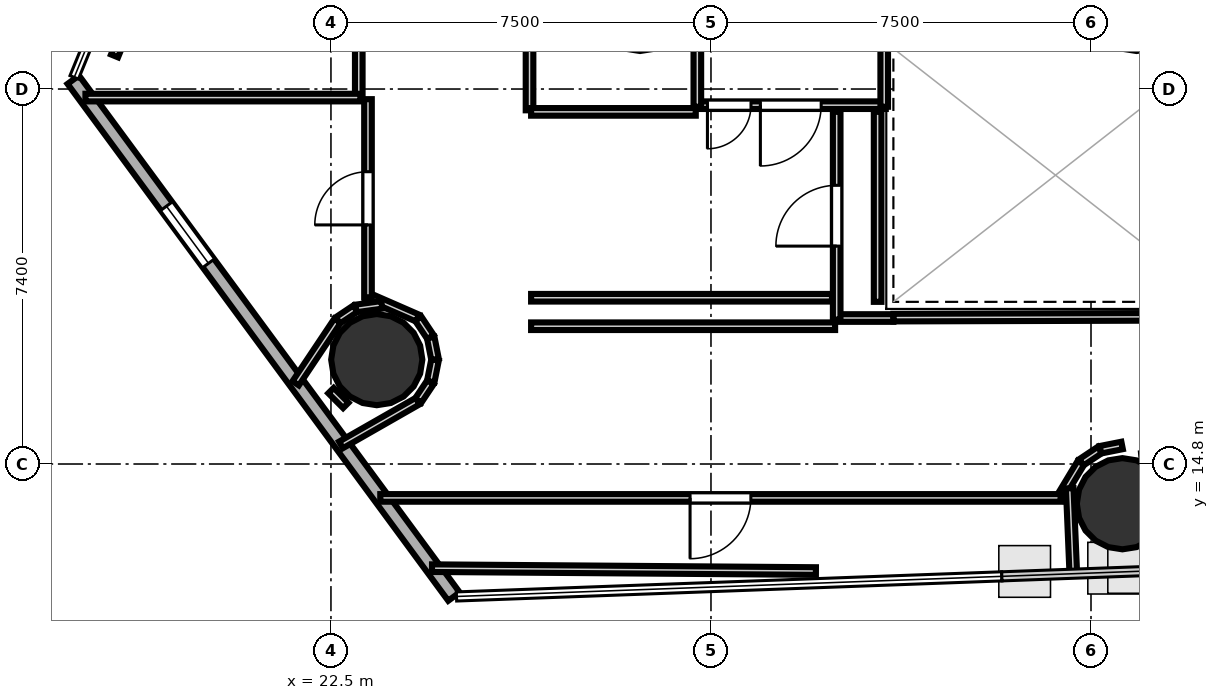
"""IFC4 building model, lengths in metres.
Left out: names, types, materials, properties, quantities, classifications, styles, units other than length and angle.
Written with IfcOpenShell. Run it as: python <this file> out.ifc"""

import sys

from ifc_helpers import new_model, si_unit, direction, frame, frame_2d, origin, origin_2d, place, context, subcontext, project, spatial, rectangle, hollow_circle, extrude, element, fill, save


model = new_model("IFC4")
c1 = context("Model", 3, precision=1e-05, world=origin(), true_north=direction((0.0, 1.0)))
c2 = subcontext(c1, "Body", "Model", "MODEL_VIEW")
j1 = project(units=[si_unit("LENGTHUNIT", "METRE"), si_unit("PLANEANGLEUNIT", "RADIAN")], contexts=[c1])
p1 = place(None, origin())
s1 = spatial("IfcSite", under=j1, at=p1, CompositionType="ELEMENT")
p2 = place(p1, origin())
s2 = spatial("IfcBuilding", under=s1, at=p2, CompositionType="ELEMENT")
p3 = place(p2, frame((0.0, 0.0, 47.9)))
s3 = spatial("IfcBuildingStorey", under=s2, at=p3, CompositionType="ELEMENT", Elevation=47.9)
for number, where, z_axis, x_axis in (
    (1, (23.404, 16.86, 0.0), (0.0, 0.0, 1.0), (1.0, 0.0, 0.0)),
    (2, (38.12, 14.016, 0.0), (0.0, 0.0, 1.0), (1.0, 0.0, 0.0)),
):
    element("IfcColumn", number, at=place(p3, frame(where, z_axis=z_axis, x_axis=x_axis)), inside=s3, PredefinedType="COLUMN", context=c2, shape_type="SweptSolid", body=[
        extrude(hollow_circle(Radius=0.9, WallThickness=0.045, at=origin_2d()), origin(), (0.0, 0.0, 1.0), 4.6),
    ])
p4 = place(p3, frame((17.415, 22.384, 0.0), z_axis=(0.0, 0.0, 1.0), x_axis=(0.593055059992, -0.805161906587, 0.0)))
e3 = element("IfcWall", 3, at=p4, inside=s3, PredefinedType="SOLIDWALL", context=c2, shape_type="SweptSolid", body=[
    extrude(rectangle(XDim=12.668, YDim=0.28, at=frame_2d((6.334, 0.0))), origin(), (0.0, 0.0, 1.0), 4.42),
])
p5 = place(p4, frame((3.101, 0.0, 1.0)))
e4 = element("IfcOpeningElement", 4, at=p5, cuts=e3, PredefinedType="OPENING", context=c2, shape_type="SweptSolid", body=[
    extrude(rectangle(XDim=1.4, YDim=1.5, at=frame_2d((0.7, 0.75))), frame((0.0, 0.15, 0.0), z_axis=(0.0, -1.0, 0.0), x_axis=(1.0, 0.0, 0.0)), (0.0, 0.0, 1.0), 0.3),
])
p6 = place(p3, frame((33.45, 21.881, 0.0), z_axis=(0.0, 0.0, 1.0), x_axis=(-1.0, 0.0, 0.0)))
e5 = element("IfcWall", 5, at=p6, inside=s3, PredefinedType="PARTITIONING", context=c2, shape_type="SweptSolid", body=[
    extrude(rectangle(XDim=3.75, YDim=0.15, at=frame_2d((1.875, 0.0))), origin(), (0.0, 0.0, 1.0), 2.94),
])
p7 = place(p6, frame((1.275, 0.0, 0.0)))
e6 = element("IfcOpeningElement", 6, at=p7, cuts=e5, PredefinedType="OPENING", context=c2, shape_type="SweptSolid", body=[
    extrude(rectangle(XDim=1.2, YDim=2.15, at=frame_2d((0.6, 1.075))), frame((0.0, 0.085, 0.0), z_axis=(0.0, -1.0, 0.0), x_axis=(1.0, 0.0, 0.0)), (0.0, 0.0, 1.0), 0.17),
])
p8 = place(p6, frame((2.66, 0.0, 0.0)))
e7 = element("IfcOpeningElement", 7, at=p8, cuts=e5, PredefinedType="OPENING", context=c2, shape_type="SweptSolid", body=[
    extrude(rectangle(XDim=0.86, YDim=2.05, at=frame_2d((0.43, 1.025))), frame((0.0, 0.085, 0.0), z_axis=(0.0, -1.0, 0.0), x_axis=(1.0, 0.0, 0.0)), (0.0, 0.0, 1.0), 0.17),
])
for number, where, z_axis, x_axis in (
    (8, (29.731, 21.85, 0.0), (0.0, 0.0, 1.0), (0.0, 1.0, 0.0)),
    (9, (33.419, 24.342, 0.0), (0.0, 0.0, 1.0), (0.0, -1.0, 0.0)),
):
    element("IfcWall", number, at=place(p3, frame(where, z_axis=z_axis, x_axis=x_axis)), inside=s3, PredefinedType="PARTITIONING", context=c2, shape_type="SweptSolid", body=[
        extrude(rectangle(XDim=2.492, YDim=0.15, at=frame_2d((1.246, 0.0))), origin(), (0.0, 0.0, 1.0), 2.94),
    ])
p9 = place(p3, frame((23.049, 32.204, 0.0), z_axis=(0.0, 0.0, 1.0), x_axis=(0.0, -1.0, 0.0)))
e10 = element("IfcWall", 10, at=p9, inside=s3, PredefinedType="PARTITIONING", context=c2, shape_type="SweptSolid", body=[
    extrude(rectangle(XDim=10.204, YDim=0.15, at=frame_2d((5.102, 0.0))), origin(), (0.0, 0.0, 1.0), 2.94),
])
p10 = place(p9, frame((4.502, 0.0, 0.0)))
e11 = element("IfcOpeningElement", 11, at=p10, cuts=e10, PredefinedType="OPENING", context=c2, shape_type="SweptSolid", body=[
    extrude(rectangle(XDim=1.2, YDim=2.15, at=frame_2d((0.6, 1.075))), frame((0.0, 0.085, 0.0), z_axis=(0.0, -1.0, 0.0), x_axis=(1.0, 0.0, 0.0)), (0.0, 0.0, 1.0), 0.17),
])
p11 = place(p3, frame((23.08, 22.031, 0.0), z_axis=(0.0, 0.0, 1.0), x_axis=(-1.0, 0.0, 0.0)))
e12 = element("IfcWall", 12, at=p11, inside=s3, PredefinedType="PARTITIONING", context=c2, shape_type="SweptSolid", body=[
    extrude(rectangle(XDim=5.426, YDim=0.15, at=frame_2d((2.713, 0.0))), origin(), (0.0, 0.0, 1.0), 2.94),
])
p12 = place(p3, frame((18.229, 22.854, 0.0), z_axis=(0.0, 0.0, 1.0), x_axis=(0.378492290578, 0.925604443579, 0.0)))
e13 = element("IfcWall", 13, at=p12, inside=s3, PredefinedType="PARTITIONING", context=c2, shape_type="SweptSolid", body=[
    extrude(rectangle(XDim=10.889, YDim=0.15, at=frame_2d((5.445, 0.0))), origin(), (0.0, 0.0, 1.0), 2.94),
])
p13 = place(p3, frame((33.6, 17.689, 0.0), z_axis=(0.0, 0.0, 1.0), x_axis=(0.999995817826, 0.002892115308, 0.0)))
e14 = element("IfcWall", 14, at=p13, inside=s3, PredefinedType="PARTITIONING", context=c2, shape_type="SweptSolid", body=[
    extrude(rectangle(XDim=6.5, YDim=0.15, at=frame_2d((3.25, 0.0))), origin(), (0.0, 0.0, 1.0), 2.94),
])
p14 = place(p3, frame((33.6, 17.681, 0.0), z_axis=(0.0, 0.0, 1.0), x_axis=(-1.0, 0.0, 0.0)))
e15 = element("IfcWall", 15, at=p14, inside=s3, PredefinedType="PARTITIONING", context=c2, shape_type="SweptSolid", body=[
    extrude(rectangle(XDim=1.15, YDim=0.15, at=frame_2d((0.575, 0.0))), origin(), (0.0, 0.0, 1.0), 2.94),
])
p15 = place(p3, frame((32.481, 17.65, 0.0), z_axis=(0.0, 0.0, 1.0), x_axis=(0.0, 1.0, 0.0)))
e16 = element("IfcWall", 16, at=p15, inside=s3, PredefinedType="PARTITIONING", context=c2, shape_type="SweptSolid", body=[
    extrude(rectangle(XDim=4.1, YDim=0.15, at=frame_2d((2.05, 0.0))), origin(), (0.0, 0.0, 1.0), 2.94),
])
p16 = place(p15, frame((1.45, 0.0, 0.0)))
e17 = element("IfcOpeningElement", 17, at=p16, cuts=e16, PredefinedType="OPENING", context=c2, shape_type="SweptSolid", body=[
    extrude(rectangle(XDim=1.2, YDim=2.15, at=frame_2d((0.6, 1.075))), frame((0.0, 0.085, 0.0), z_axis=(0.0, -1.0, 0.0), x_axis=(1.0, 0.0, 0.0)), (0.0, 0.0, 1.0), 0.17),
])
p17 = place(p3, frame((33.289, 21.75, 0.0), z_axis=(0.0, 0.0, 1.0), x_axis=(0.0, -1.0, 0.0)))
e18 = element("IfcWall", 18, at=p17, inside=s3, PredefinedType="PARTITIONING", context=c2, shape_type="SweptSolid", body=[
    extrude(rectangle(XDim=3.75, YDim=0.15, at=frame_2d((1.875, 0.0))), origin(), (0.0, 0.0, 1.0), 2.94),
])
p18 = place(p3, frame((26.419, 24.548, 0.0), z_axis=(0.0, 0.0, 1.0), x_axis=(0.0, -1.0, 0.0)))
e19 = element("IfcWall", 19, at=p18, inside=s3, PredefinedType="PARTITIONING", context=c2, shape_type="SweptSolid", body=[
    extrude(rectangle(XDim=2.768, YDim=0.15, at=frame_2d((1.384, 0.0))), origin(), (0.0, 0.0, 1.0), 2.94),
])
p19 = place(p3, frame((26.45, 21.749, 0.0), z_axis=(0.0, 0.0, 1.0), x_axis=(1.0, 0.0, 0.0)))
e20 = element("IfcWall", 20, at=p19, inside=s3, PredefinedType="PARTITIONING", context=c2, shape_type="SweptSolid", body=[
    extrude(rectangle(XDim=3.25, YDim=0.15, at=frame_2d((1.625, 0.0))), origin(), (0.0, 0.0, 1.0), 2.94),
])
p20 = place(p3, frame((32.388, 18.081, 0.0), z_axis=(0.0, 0.0, 1.0), x_axis=(-1.0, 0.0, 0.0)))
e21 = element("IfcWall", 21, at=p20, inside=s3, PredefinedType="PARTITIONING", context=c2, shape_type="SweptSolid", body=[
    extrude(rectangle(XDim=5.938, YDim=0.15, at=frame_2d((2.969, 0.0))), origin(), (0.0, 0.0, 1.0), 2.94),
])
p21 = place(p3, frame((26.45, 17.519, 0.0), z_axis=(0.0, 0.0, 1.0), x_axis=(1.0, 0.0, 0.0)))
e22 = element("IfcWall", 22, at=p21, inside=s3, PredefinedType="PARTITIONING", context=c2, shape_type="SweptSolid", body=[
    extrude(rectangle(XDim=6.0, YDim=0.15, at=frame_2d((3.0, 0.0))), origin(), (0.0, 0.0, 1.0), 2.94),
])
p22 = place(p3, frame((38.114, 15.167, 0.0), z_axis=(0.0, 0.0, 1.0), x_axis=(-0.980709346372, -0.195471680655, 0.0)))
e23 = element("IfcWall", 23, at=p22, inside=s3, PredefinedType="PARTITIONING", context=c2, shape_type="SweptSolid", body=[
    extrude(rectangle(XDim=0.437, YDim=0.15, at=frame_2d((0.219, 0.0))), origin(), (0.0, 0.0, 1.0), 2.94),
])
p23 = place(p3, frame((37.674, 15.076, 0.0), z_axis=(0.0, 0.0, 1.0), x_axis=(-0.83170640099, -0.555215690117, 0.0)))
e24 = element("IfcWall", 24, at=p23, inside=s3, PredefinedType="PARTITIONING", context=c2, shape_type="SweptSolid", body=[
    extrude(rectangle(XDim=0.437, YDim=0.15, at=frame_2d((0.219, 0.0))), origin(), (0.0, 0.0, 1.0), 2.94),
])
p24 = place(p3, frame((37.302, 14.824, 0.0), z_axis=(0.0, 0.0, 1.0), x_axis=(-0.516448492629, -0.856318255359, 0.0)))
e25 = element("IfcWall", 25, at=p24, inside=s3, PredefinedType="PARTITIONING", context=c2, shape_type="SweptSolid", body=[
    extrude(rectangle(XDim=0.827, YDim=0.15, at=frame_2d((0.414, 0.0))), origin(), (0.0, 0.0, 1.0), 2.94),
])
p25 = place(p3, frame((36.901, 14.131, 0.0), z_axis=(0.0, 0.0, 1.0), x_axis=(-1.0, 0.0, 0.0)))
e26 = element("IfcWall", 26, at=p25, inside=s3, PredefinedType="PARTITIONING", context=c2, shape_type="SweptSolid", body=[
    extrude(rectangle(XDim=13.428, YDim=0.15, at=frame_2d((6.714, 0.0))), origin(), (0.0, 0.0, 1.0), 2.94),
])
p26 = place(p25, frame((6.114, 0.0, 0.0)))
e27 = element("IfcOpeningElement", 27, at=p26, cuts=e26, PredefinedType="OPENING", context=c2, shape_type="SweptSolid", body=[
    extrude(rectangle(XDim=1.2, YDim=2.15, at=frame_2d((0.6, 1.075))), frame((0.0, 0.085, 0.0), z_axis=(0.0, -1.0, 0.0), x_axis=(1.0, 0.0, 0.0)), (0.0, 0.0, 1.0), 0.17),
])
p27 = place(p3, frame((22.698, 15.177, 0.0), z_axis=(0.0, 0.0, 1.0), x_axis=(0.868372461428, 0.495912561077, 0.0)))
e28 = element("IfcWall", 28, at=p27, inside=s3, PredefinedType="PARTITIONING", context=c2, shape_type="SweptSolid", body=[
    extrude(rectangle(XDim=1.742, YDim=0.15, at=frame_2d((0.871, 0.0))), origin(), (0.0, 0.0, 1.0), 2.94),
])
for number, where, z_axis, x_axis in (
    (29, (24.222, 16.051, 0.0), (0.0, 0.0, 1.0), (0.556, 0.831, 0.0)),
    (30, (24.469, 16.425, 0.0), (0.0, 0.0, 1.0), (0.195, 0.981, 0.0)),
    (31, (24.554, 16.866, 0.0), (0.0, 0.0, 1.0), (-0.195, 0.981, 0.0)),
):
    element("IfcWall", number, at=place(p3, frame(where, z_axis=z_axis, x_axis=x_axis)), inside=s3, PredefinedType="PARTITIONING", context=c2, shape_type="SweptSolid", body=[
        extrude(rectangle(XDim=0.437, YDim=0.15, at=frame_2d((0.219, 0.0))), origin(), (0.0, 0.0, 1.0), 2.94),
    ])
p28 = place(p3, frame((24.465, 17.306, 0.0), z_axis=(0.0, 0.0, 1.0), x_axis=(-0.555859936624, 0.831275965523, 0.0)))
e32 = element("IfcWall", 32, at=p28, inside=s3, PredefinedType="PARTITIONING", context=c2, shape_type="SweptSolid", body=[
    extrude(rectangle(XDim=0.437, YDim=0.15, at=frame_2d((0.219, 0.0))), origin(), (0.0, 0.0, 1.0), 2.94),
])
p29 = place(p3, frame((24.208, 17.68, 0.0), z_axis=(0.0, 0.0, 1.0), x_axis=(-0.916569320728, 0.399875831102, 0.0)))
e33 = element("IfcWall", 33, at=p29, inside=s3, PredefinedType="PARTITIONING", context=c2, shape_type="SweptSolid", body=[
    extrude(rectangle(XDim=1.087, YDim=0.15, at=frame_2d((0.543, 0.0))), origin(), (0.0, 0.0, 1.0), 2.94),
])
p30 = place(p3, frame((23.231, 18.087, 0.0), z_axis=(0.0, 0.0, 1.0), x_axis=(0.0, 1.0, 0.0)))
e34 = element("IfcWall", 34, at=p30, inside=s3, PredefinedType="PARTITIONING", context=c2, shape_type="SweptSolid", body=[
    extrude(rectangle(XDim=3.913, YDim=0.15, at=frame_2d((1.957, 0.0))), origin(), (0.0, 0.0, 1.0), 2.94),
])
p31 = place(p30, frame((1.432, 0.0, 0.0)))
e35 = element("IfcOpeningElement", 35, at=p31, cuts=e34, PredefinedType="OPENING", context=c2, shape_type="SweptSolid", body=[
    extrude(rectangle(XDim=1.05, YDim=2.15, at=frame_2d((0.525, 1.075))), frame((0.0, 0.085, 0.0), z_axis=(0.0, -1.0, 0.0), x_axis=(1.0, 0.0, 0.0)), (0.0, 0.0, 1.0), 0.17),
])
p32 = place(p3, frame((37.08, 14.322, 0.0), z_axis=(0.0, 0.0, 1.0), x_axis=(0.041874267807, -0.999122888185, 0.0)))
e36 = element("IfcWall", 36, at=p32, inside=s3, PredefinedType="PARTITIONING", context=c2, shape_type="SweptSolid", body=[
    extrude(rectangle(XDim=1.708, YDim=0.15, at=frame_2d((0.854, 0.0))), origin(), (0.0, 0.0, 1.0), 2.94),
])
p33 = place(p3, frame((32.071, 12.688, 0.0), z_axis=(0.0, 0.0, 1.0), x_axis=(-0.999972060137, 0.007475222103, 0.0)))
e37 = element("IfcWall", 37, at=p33, inside=s3, PredefinedType="PARTITIONING", context=c2, shape_type="SweptSolid", body=[
    extrude(rectangle(XDim=7.577, YDim=0.15, at=frame_2d((3.789, 0.0))), origin(), (0.0, 0.0, 1.0), 2.94),
])
p34 = place(p3, frame((23.504, 17.94, 0.0), z_axis=(0.0, 0.0, 1.0), x_axis=(-0.990621129243, -0.136637397137, 0.0)))
e38 = element("IfcWall", 38, at=p34, inside=s3, PredefinedType="PARTITIONING", context=c2, shape_type="SweptSolid", body=[
    extrude(rectangle(XDim=0.515, YDim=0.15, at=frame_2d((0.257, 0.0))), origin(), (0.0, 0.0, 1.0), 2.94),
])
p35 = place(p3, frame((22.981, 17.865, 0.0), z_axis=(0.0, 0.0, 1.0), x_axis=(-0.831596013349, -0.555381013883, 0.0)))
e39 = element("IfcWall", 39, at=p35, inside=s3, PredefinedType="PARTITIONING", context=c2, shape_type="SweptSolid", body=[
    extrude(rectangle(XDim=0.414, YDim=0.15, at=frame_2d((0.207, 0.0))), origin(), (0.0, 0.0, 1.0), 2.94),
])
p36 = place(p3, frame((22.629, 17.627, 0.0), z_axis=(0.0, 0.0, 1.0), x_axis=(-0.555573095097, -0.831467699917, 0.0)))
e40 = element("IfcWall", 40, at=p36, inside=s3, PredefinedType="PARTITIONING", context=c2, shape_type="SweptSolid", body=[
    extrude(rectangle(XDim=1.484, YDim=0.15, at=frame_2d((0.742, 0.0))), origin(), (0.0, 0.0, 1.0), 2.94),
])
p37 = place(p3, frame((22.501, 16.249, 0.0), z_axis=(0.0, 0.0, 1.0), x_axis=(0.707106781187, -0.707106781187, 0.0)))
e41 = element("IfcWall", 41, at=p37, inside=s3, PredefinedType="PARTITIONING", context=c2, shape_type="SweptSolid", body=[
    extrude(rectangle(XDim=0.414, YDim=0.15, at=frame_2d((0.207, 0.0))), origin(), (0.0, 0.0, 1.0), 2.94),
])
p38 = place(p7, origin())
e42 = element("IfcDoor", 42, at=p38, inside=s3, OperationType="SINGLE_SWING_RIGHT", PredefinedType="DOOR", context=c2, shape_type="SweptSolid", body=[
    extrude(rectangle(XDim=1.2, YDim=2.15, at=frame_2d((0.6, 1.075))), frame((0.0, 0.025, 0.0), z_axis=(0.0, -1.0, 0.0), x_axis=(1.0, 0.0, 0.0)), (0.0, 0.0, 1.0), 0.05),
])
fill(e6, e42)
p39 = place(p16, origin())
e43 = element("IfcDoor", 43, at=p39, inside=s3, OperationType="SINGLE_SWING_LEFT", PredefinedType="DOOR", context=c2, shape_type="SweptSolid", body=[
    extrude(rectangle(XDim=1.2, YDim=2.15, at=frame_2d((0.6, 1.075))), frame((0.0, 0.025, 0.0), z_axis=(0.0, -1.0, 0.0), x_axis=(1.0, 0.0, 0.0)), (0.0, 0.0, 1.0), 0.05),
])
fill(e17, e43)
p40 = place(p26, origin())
e44 = element("IfcDoor", 44, at=p40, inside=s3, OperationType="SINGLE_SWING_RIGHT", PredefinedType="DOOR", context=c2, shape_type="SweptSolid", body=[
    extrude(rectangle(XDim=1.2, YDim=2.15, at=frame_2d((0.6, 1.075))), frame((0.0, 0.025, 0.0), z_axis=(0.0, -1.0, 0.0), x_axis=(1.0, 0.0, 0.0)), (0.0, 0.0, 1.0), 0.05),
])
fill(e27, e44)
p41 = place(p8, origin())
e45 = element("IfcDoor", 45, at=p41, inside=s3, OperationType="SINGLE_SWING_RIGHT", PredefinedType="DOOR", context=c2, shape_type="SweptSolid", body=[
    extrude(rectangle(XDim=0.86, YDim=2.05, at=frame_2d((0.43, 1.025))), frame((0.0, 0.025, 0.0), z_axis=(0.0, -1.0, 0.0), x_axis=(1.0, 0.0, 0.0)), (0.0, 0.0, 1.0), 0.05),
])
fill(e7, e45)
p42 = place(p31, origin())
e46 = element("IfcDoor", 46, at=p42, inside=s3, OperationType="SINGLE_SWING_LEFT", PredefinedType="DOOR", context=c2, shape_type="SweptSolid", body=[
    extrude(rectangle(XDim=1.05, YDim=2.15, at=frame_2d((0.525, 1.075))), frame((0.0, 0.025, 0.0), z_axis=(0.0, -1.0, 0.0), x_axis=(1.0, 0.0, 0.0)), (0.0, 0.0, 1.0), 0.05),
])
fill(e35, e46)
p43 = place(p5, origin())
e47 = element("IfcWindow", 47, at=p43, inside=s3, PartitioningType="SINGLE_PANEL", PredefinedType="WINDOW", context=c2, shape_type="SweptSolid", body=[
    extrude(rectangle(XDim=1.4, YDim=1.5, at=frame_2d((0.7, 0.75))), frame((0.0, 0.03, 0.0), z_axis=(0.0, -1.0, 0.0), x_axis=(1.0, 0.0, 0.0)), (0.0, 0.0, 1.0), 0.06),
])
fill(e4, e47)
save(model, sys.argv[1])
